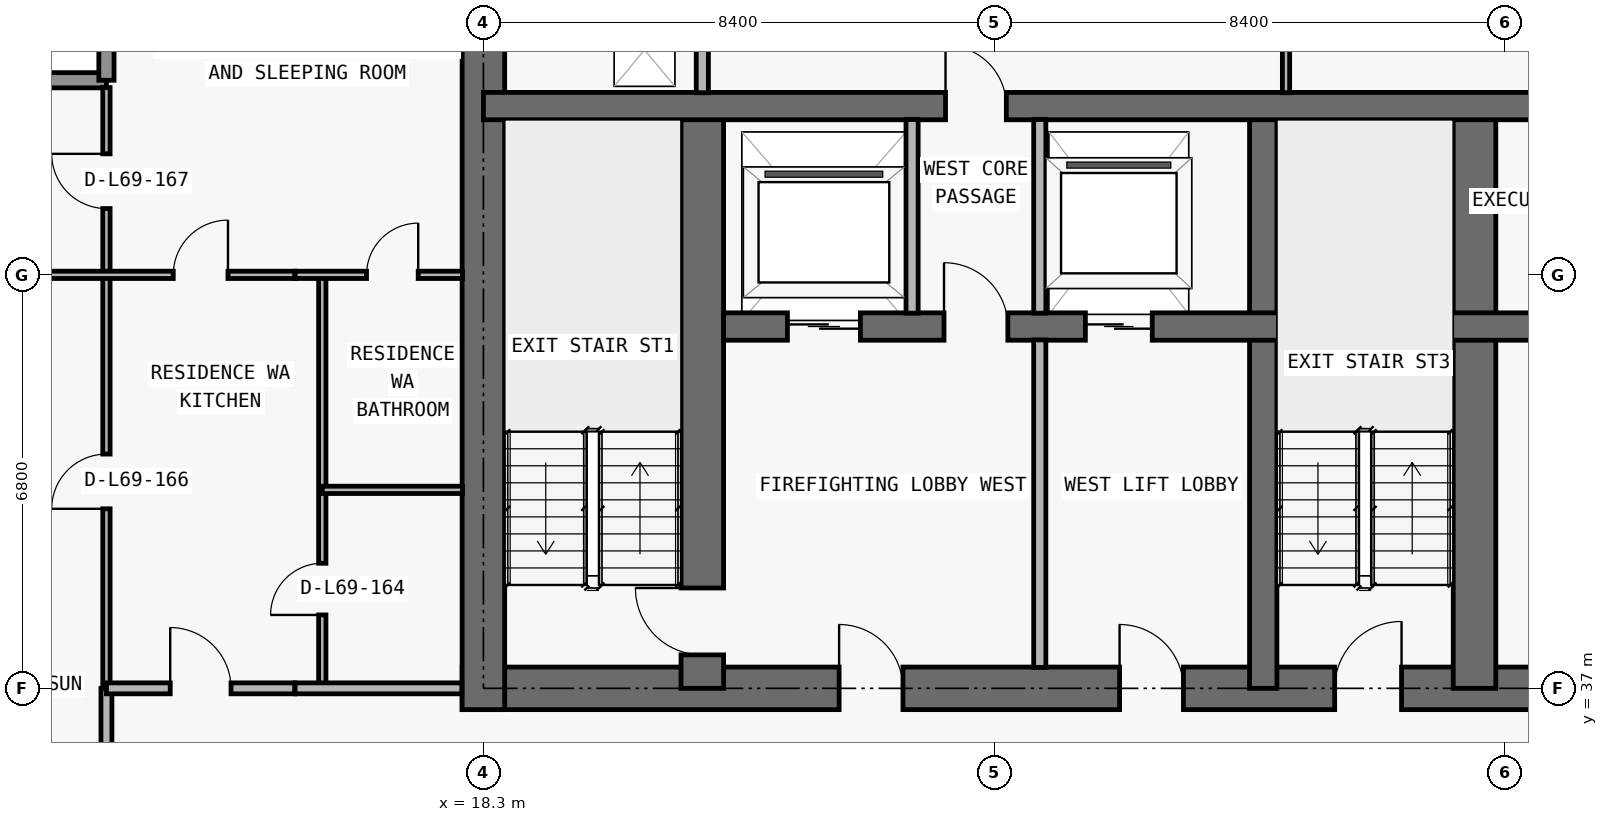
"""IFC4 building model, lengths in metres.
Left out: names, types, materials, properties, quantities, classifications, styles, units other than length and angle.
Written with IfcOpenShell. Run it as: python <this file> out.ifc"""

import sys

from ifc_helpers import new_model, si_unit, direction, frame, frame_2d, origin, place, context, subcontext, project, spatial, rectangle, extrude, element, fill, save


model = new_model("IFC4")
c1 = context("Model", 3, precision=1e-05, world=origin(), true_north=direction((0.0, 1.0)))
c2 = subcontext(c1, "Body", "Model", "MODEL_VIEW")
j1 = project(units=[si_unit("LENGTHUNIT", "METRE"), si_unit("PLANEANGLEUNIT", "RADIAN")], contexts=[c1])
p1 = place(None, origin())
s1 = spatial("IfcSite", under=j1, at=p1, CompositionType="ELEMENT")
p2 = place(p1, origin())
s2 = spatial("IfcBuilding", under=s1, at=p2, CompositionType="ELEMENT")
p3 = place(p2, frame((0.0, 0.0, 246.3)))
s3 = spatial("IfcBuildingStorey", under=s2, at=p3, CompositionType="ELEMENT", Elevation=246.3)
p4 = place(p3, frame((17.95, 37.0, 0.0), z_axis=(0.0, 0.0, 1.0), x_axis=(1.0, 0.0, 0.0)))
e1 = element("IfcWall", 1, at=p4, inside=s3, PredefinedType="SHEAR", context=c2, shape_type="SweptSolid", body=[
    extrude(rectangle(XDim=41.9, YDim=0.7, at=frame_2d((20.95, 0.0))), origin(), (0.0, 0.0, 1.0), 3.05),
])
p5 = place(p4, frame((14.35, 0.0, 0.0)))
e2 = element("IfcOpeningElement", 2, at=p5, cuts=e1, PredefinedType="OPENING", context=c2, shape_type="SweptSolid", body=[
    extrude(rectangle(XDim=1.1, YDim=2.15, at=frame_2d((0.55, 1.075))), frame((0.0, 0.36, 0.0), z_axis=(0.0, -1.0, 0.0), x_axis=(1.0, 0.0, 0.0)), (0.0, 0.0, 1.0), 0.72),
])
p6 = place(p4, frame((6.2, 0.0, 0.0)))
e3 = element("IfcOpeningElement", 3, at=p6, cuts=e1, PredefinedType="OPENING", context=c2, shape_type="SweptSolid", body=[
    extrude(rectangle(XDim=1.05, YDim=2.15, at=frame_2d((0.525, 1.075))), frame((0.0, 0.36, 0.0), z_axis=(0.0, -1.0, 0.0), x_axis=(1.0, 0.0, 0.0)), (0.0, 0.0, 1.0), 0.72),
])
p7 = place(p4, frame((34.7, 0.0, 0.0)))
e4 = element("IfcOpeningElement", 4, at=p7, cuts=e1, PredefinedType="OPENING", context=c2, shape_type="SweptSolid", body=[
    extrude(rectangle(XDim=1.05, YDim=2.15, at=frame_2d((0.525, 1.075))), frame((0.0, 0.36, 0.0), z_axis=(0.0, -1.0, 0.0), x_axis=(1.0, 0.0, 0.0)), (0.0, 0.0, 1.0), 0.72),
])
p8 = place(p4, frame((10.812, 0.0, 0.0)))
e5 = element("IfcOpeningElement", 5, at=p8, cuts=e1, PredefinedType="OPENING", context=c2, shape_type="SweptSolid", body=[
    extrude(rectangle(XDim=1.05, YDim=2.15, at=frame_2d((0.525, 1.075))), frame((0.0, 0.36, 0.0), z_axis=(0.0, -1.0, 0.0), x_axis=(1.0, 0.0, 0.0)), (0.0, 0.0, 1.0), 0.72),
])
p9 = place(p4, frame((24.05, 0.0, 0.0)))
e6 = element("IfcOpeningElement", 6, at=p9, cuts=e1, PredefinedType="OPENING", context=c2, shape_type="SweptSolid", body=[
    extrude(rectangle(XDim=1.05, YDim=2.15, at=frame_2d((0.525, 1.075))), frame((0.0, 0.36, 0.0), z_axis=(0.0, -1.0, 0.0), x_axis=(1.0, 0.0, 0.0)), (0.0, 0.0, 1.0), 0.72),
])
p10 = place(p3, frame((18.3, 36.65, 0.0), z_axis=(0.0, 0.0, 1.0), x_axis=(0.0, 1.0, 0.0)))
e7 = element("IfcWall", 7, at=p10, inside=s3, PredefinedType="SHEAR", context=c2, shape_type="SweptSolid", body=[
    extrude(rectangle(XDim=13.95, YDim=0.7, at=frame_2d((6.975, 0.0))), origin(), (0.0, 0.0, 1.0), 3.05),
])
p11 = place(p3, frame((21.9, 37.0, 0.0), z_axis=(0.0, 0.0, 1.0), x_axis=(0.0, 1.0, 0.0)))
e8 = element("IfcWall", 8, at=p11, inside=s3, PredefinedType="SHEAR", context=c2, shape_type="SweptSolid", body=[
    extrude(rectangle(XDim=9.575, YDim=0.7, at=frame_2d((4.788, 0.0))), origin(), (0.0, 0.0, 1.0), 3.05),
])
p12 = place(p11, frame((0.55, 0.0, 0.0)))
e9 = element("IfcOpeningElement", 9, at=p12, cuts=e8, PredefinedType="OPENING", context=c2, shape_type="SweptSolid", body=[
    extrude(rectangle(XDim=1.1, YDim=2.15, at=frame_2d((0.55, 1.075))), frame((0.0, 0.36, 0.0), z_axis=(0.0, -1.0, 0.0), x_axis=(1.0, 0.0, 0.0)), (0.0, 0.0, 1.0), 0.72),
])
p13 = place(p3, frame((31.125, 37.0, 0.0), z_axis=(0.0, 0.0, 1.0), x_axis=(0.0, 1.0, 0.0)))
e10 = element("IfcWall", 10, at=p13, inside=s3, PredefinedType="SHEAR", context=c2, shape_type="SweptSolid", body=[
    extrude(rectangle(XDim=9.575, YDim=0.45, at=frame_2d((4.788, 0.0))), origin(), (0.0, 0.0, 1.0), 3.05),
])
p14 = place(p3, frame((34.6, 37.0, 0.0), z_axis=(0.0, 0.0, 1.0), x_axis=(0.0, 1.0, 0.0)))
e11 = element("IfcWall", 11, at=p14, inside=s3, PredefinedType="SHEAR", context=c2, shape_type="SweptSolid", body=[
    extrude(rectangle(XDim=9.575, YDim=0.7, at=frame_2d((4.788, 0.0))), origin(), (0.0, 0.0, 1.0), 3.05),
])
p15 = place(p3, frame((22.25, 42.95, 0.0), z_axis=(0.0, 0.0, 1.0), x_axis=(1.0, 0.0, 0.0)))
e12 = element("IfcWall", 12, at=p15, inside=s3, PredefinedType="SHEAR", context=c2, shape_type="SweptSolid", body=[
    extrude(rectangle(XDim=33.3, YDim=0.45, at=frame_2d((16.65, 0.0))), origin(), (0.0, 0.0, 1.0), 3.05),
])
p16 = place(p15, frame((1.05, 0.0, 0.0)))
e13 = element("IfcOpeningElement", 13, at=p16, cuts=e12, PredefinedType="OPENING", context=c2, shape_type="SweptSolid", body=[
    extrude(rectangle(XDim=1.2, YDim=2.2, at=frame_2d((0.6, 1.1))), frame((0.0, 0.235, 0.0), z_axis=(0.0, -1.0, 0.0), x_axis=(1.0, 0.0, 0.0)), (0.0, 0.0, 1.0), 0.47),
])
p17 = place(p15, frame((31.05, 0.0, 0.0)))
e14 = element("IfcOpeningElement", 14, at=p17, cuts=e12, PredefinedType="OPENING", context=c2, shape_type="SweptSolid", body=[
    extrude(rectangle(XDim=1.2, YDim=2.2, at=frame_2d((0.6, 1.1))), frame((0.0, 0.235, 0.0), z_axis=(0.0, -1.0, 0.0), x_axis=(1.0, 0.0, 0.0)), (0.0, 0.0, 1.0), 0.47),
])
p18 = place(p15, frame((26.45, 0.0, 0.0)))
e15 = element("IfcOpeningElement", 15, at=p18, cuts=e12, PredefinedType="OPENING", context=c2, shape_type="SweptSolid", body=[
    extrude(rectangle(XDim=1.1, YDim=2.2, at=frame_2d((0.55, 1.1))), frame((0.0, 0.235, 0.0), z_axis=(0.0, -1.0, 0.0), x_axis=(1.0, 0.0, 0.0)), (0.0, 0.0, 1.0), 0.47),
])
p19 = place(p15, frame((5.95, 0.0, 0.0)))
e16 = element("IfcOpeningElement", 16, at=p19, cuts=e12, PredefinedType="OPENING", context=c2, shape_type="SweptSolid", body=[
    extrude(rectangle(XDim=1.1, YDim=2.2, at=frame_2d((0.55, 1.1))), frame((0.0, 0.235, 0.0), z_axis=(0.0, -1.0, 0.0), x_axis=(1.0, 0.0, 0.0)), (0.0, 0.0, 1.0), 0.47),
])
p20 = place(p15, frame((3.625, 0.0, 0.0)))
e17 = element("IfcOpeningElement", 17, at=p20, cuts=e12, PredefinedType="OPENING", context=c2, shape_type="SweptSolid", body=[
    extrude(rectangle(XDim=1.05, YDim=2.15, at=frame_2d((0.525, 1.075))), frame((0.0, 0.235, 0.0), z_axis=(0.0, -1.0, 0.0), x_axis=(1.0, 0.0, 0.0)), (0.0, 0.0, 1.0), 0.47),
])
p21 = place(p15, frame((28.675, 0.0, 0.0)))
e18 = element("IfcOpeningElement", 18, at=p21, cuts=e12, PredefinedType="OPENING", context=c2, shape_type="SweptSolid", body=[
    extrude(rectangle(XDim=1.05, YDim=2.15, at=frame_2d((0.525, 1.075))), frame((0.0, 0.235, 0.0), z_axis=(0.0, -1.0, 0.0), x_axis=(1.0, 0.0, 0.0)), (0.0, 0.0, 1.0), 0.47),
])
p22 = place(p15, frame((14.7, 0.0, 0.0)))
e19 = element("IfcOpeningElement", 19, at=p22, cuts=e12, PredefinedType="OPENING", context=c2, shape_type="SweptSolid", body=[
    extrude(rectangle(XDim=1.0, YDim=2.2, at=frame_2d((0.5, 1.1))), frame((0.0, 0.235, 0.0), z_axis=(0.0, -1.0, 0.0), x_axis=(1.0, 0.0, 0.0)), (0.0, 0.0, 1.0), 0.47),
])
p23 = place(p15, frame((21.45, 0.0, 0.0)))
e20 = element("IfcOpeningElement", 20, at=p23, cuts=e12, PredefinedType="OPENING", context=c2, shape_type="SweptSolid", body=[
    extrude(rectangle(XDim=1.0, YDim=2.2, at=frame_2d((0.5, 1.1))), frame((0.0, 0.235, 0.0), z_axis=(0.0, -1.0, 0.0), x_axis=(1.0, 0.0, 0.0)), (0.0, 0.0, 1.0), 0.47),
])
p24 = place(p3, frame((18.3, 46.575, 0.0), z_axis=(0.0, 0.0, 1.0), x_axis=(1.0, 0.0, 0.0)))
e21 = element("IfcWall", 21, at=p24, inside=s3, PredefinedType="SHEAR", context=c2, shape_type="SweptSolid", body=[
    extrude(rectangle(XDim=41.2, YDim=0.45, at=frame_2d((20.6, 0.0))), origin(), (0.0, 0.0, 1.0), 3.05),
])
p25 = place(p24, frame((7.6, 0.0, 0.0)))
e22 = element("IfcOpeningElement", 22, at=p25, cuts=e21, PredefinedType="OPENING", context=c2, shape_type="SweptSolid", body=[
    extrude(rectangle(XDim=1.0, YDim=2.2, at=frame_2d((0.5, 1.1))), frame((0.0, 0.235, 0.0), z_axis=(0.0, -1.0, 0.0), x_axis=(1.0, 0.0, 0.0)), (0.0, 0.0, 1.0), 0.47),
])
p26 = place(p24, frame((32.625, 0.0, 0.0)))
e23 = element("IfcOpeningElement", 23, at=p26, cuts=e21, PredefinedType="OPENING", context=c2, shape_type="SweptSolid", body=[
    extrude(rectangle(XDim=1.05, YDim=2.15, at=frame_2d((0.525, 1.075))), frame((0.0, 0.235, 0.0), z_axis=(0.0, -1.0, 0.0), x_axis=(1.0, 0.0, 0.0)), (0.0, 0.0, 1.0), 0.47),
])
p27 = place(p3, frame((8.25, 47.0, 0.0), z_axis=(0.0, 0.0, 1.0), x_axis=(1.0, 0.0, 0.0)))
e24 = element("IfcWall", 24, at=p27, inside=s3, PredefinedType="ELEMENTEDWALL", context=c2, shape_type="SweptSolid", body=[
    extrude(rectangle(XDim=3.85, YDim=0.25, at=frame_2d((1.925, 0.0))), origin(), (0.0, 0.0, 1.0), 3.05),
])
p28 = place(p3, frame((12.1, 47.0, 0.0), z_axis=(0.0, 0.0, 1.0), x_axis=(0.0, 1.0, 0.0)))
e25 = element("IfcWall", 25, at=p28, inside=s3, PredefinedType="ELEMENTEDWALL", context=c2, shape_type="SweptSolid", body=[
    extrude(rectangle(XDim=3.45, YDim=0.25, at=frame_2d((1.725, 0.0))), origin(), (0.0, 0.0, 1.0), 3.05),
])
p29 = place(p3, frame((12.1, 33.705, 0.0), z_axis=(0.0, 0.0, 1.0), x_axis=(0.0, 1.0, 0.0)))
e26 = element("IfcWall", 26, at=p29, inside=s3, PredefinedType="PARTITIONING", context=c2, shape_type="SweptSolid", body=[
    extrude(rectangle(XDim=3.295, YDim=0.18, at=frame_2d((1.647, 0.0))), origin(), (0.0, 0.0, 1.0), 2.725),
])
p30 = place(p3, frame((12.1, 37.005, 0.0), z_axis=(0.0, 0.0, 1.0), x_axis=(0.0, 1.0, 0.0)))
e27 = element("IfcWall", 27, at=p30, inside=s3, PredefinedType="PARTITIONING", context=c2, shape_type="SweptSolid", body=[
    extrude(rectangle(XDim=9.875, YDim=0.12, at=frame_2d((4.938, 0.0))), origin(), (0.0, 0.0, 1.0), 2.725),
])
p31 = place(p30, frame((2.948, 0.0, 0.0)))
e28 = element("IfcOpeningElement", 28, at=p31, cuts=e27, PredefinedType="OPENING", context=c2, shape_type="SweptSolid", body=[
    extrude(rectangle(XDim=0.9, YDim=2.15, at=frame_2d((0.45, 1.075))), frame((0.0, 0.07, 0.0), z_axis=(0.0, -1.0, 0.0), x_axis=(1.0, 0.0, 0.0)), (0.0, 0.0, 1.0), 0.14),
])
p32 = place(p30, frame((7.885, 0.0, 0.0)))
e29 = element("IfcOpeningElement", 29, at=p32, cuts=e27, PredefinedType="OPENING", context=c2, shape_type="SweptSolid", body=[
    extrude(rectangle(XDim=0.9, YDim=2.15, at=frame_2d((0.45, 1.075))), frame((0.0, 0.07, 0.0), z_axis=(0.0, -1.0, 0.0), x_axis=(1.0, 0.0, 0.0)), (0.0, 0.0, 1.0), 0.14),
])
p33 = place(p3, frame((15.65, 37.0, 0.0), z_axis=(0.0, 0.0, 1.0), x_axis=(0.0, 1.0, 0.0)))
e30 = element("IfcWall", 30, at=p33, inside=s3, PredefinedType="PARTITIONING", context=c2, shape_type="SweptSolid", body=[
    extrude(rectangle(XDim=6.8, YDim=0.12, at=frame_2d((3.4, 0.0))), origin(), (0.0, 0.0, 1.0), 3.05),
])
p34 = place(p33, frame((1.207, 0.0, 0.0)))
e31 = element("IfcOpeningElement", 31, at=p34, cuts=e30, PredefinedType="OPENING", context=c2, shape_type="SweptSolid", body=[
    extrude(rectangle(XDim=0.85, YDim=2.1, at=frame_2d((0.425, 1.05))), frame((0.0, 0.07, 0.0), z_axis=(0.0, -1.0, 0.0), x_axis=(1.0, 0.0, 0.0)), (0.0, 0.0, 1.0), 0.14),
])
p35 = place(p3, frame((21.9, 46.795, 0.0), z_axis=(0.0, 0.0, 1.0), x_axis=(0.0, 1.0, 0.0)))
e32 = element("IfcWall", 32, at=p35, inside=s3, PredefinedType="PARTITIONING", context=c2, shape_type="SweptSolid", body=[
    extrude(rectangle(XDim=3.16, YDim=0.2, at=frame_2d((1.58, 0.0))), origin(), (0.0, 0.0, 1.0), 3.05),
])
p36 = place(p3, frame((25.35, 43.17, 0.0), z_axis=(0.0, 0.0, 1.0), x_axis=(0.0, 1.0, 0.0)))
e33 = element("IfcWall", 33, at=p36, inside=s3, PredefinedType="PARTITIONING", context=c2, shape_type="SweptSolid", body=[
    extrude(rectangle(XDim=3.185, YDim=0.2, at=frame_2d((1.593, 0.0))), origin(), (0.0, 0.0, 1.0), 3.05),
])
p37 = place(p3, frame((27.45, 37.345, 0.0), z_axis=(0.0, 0.0, 1.0), x_axis=(0.0, 1.0, 0.0)))
e34 = element("IfcWall", 34, at=p37, inside=s3, PredefinedType="PARTITIONING", context=c2, shape_type="SweptSolid", body=[
    extrude(rectangle(XDim=5.385, YDim=0.2, at=frame_2d((2.692, 0.0))), origin(), (0.0, 0.0, 1.0), 3.05),
])
p38 = place(p3, frame((27.45, 43.17, 0.0), z_axis=(0.0, 0.0, 1.0), x_axis=(0.0, 1.0, 0.0)))
e35 = element("IfcWall", 35, at=p38, inside=s3, PredefinedType="PARTITIONING", context=c2, shape_type="SweptSolid", body=[
    extrude(rectangle(XDim=3.185, YDim=0.2, at=frame_2d((1.593, 0.0))), origin(), (0.0, 0.0, 1.0), 3.05),
])
p39 = place(p3, frame((31.5, 46.795, 0.0), z_axis=(0.0, 0.0, 1.0), x_axis=(0.0, 1.0, 0.0)))
e36 = element("IfcWall", 36, at=p39, inside=s3, PredefinedType="PARTITIONING", context=c2, shape_type="SweptSolid", body=[
    extrude(rectangle(XDim=3.16, YDim=0.12, at=frame_2d((1.58, 0.0))), origin(), (0.0, 0.0, 1.0), 3.05),
])
p40 = place(p3, frame((12.1, 37.0, 0.0), z_axis=(0.0, 0.0, 1.0), x_axis=(1.0, 0.0, 0.0)))
e37 = element("IfcWall", 37, at=p40, inside=s3, PredefinedType="PARTITIONING", context=c2, shape_type="SweptSolid", body=[
    extrude(rectangle(XDim=3.098, YDim=0.18, at=frame_2d((1.549, 0.0))), origin(), (0.0, 0.0, 1.0), 3.05),
])
p41 = place(p40, frame((1.049, 0.0, 0.0)))
e38 = element("IfcOpeningElement", 38, at=p41, cuts=e37, PredefinedType="OPENING", context=c2, shape_type="SweptSolid", body=[
    extrude(rectangle(XDim=1.0, YDim=2.2, at=frame_2d((0.5, 1.1))), frame((0.0, 0.1, 0.0), z_axis=(0.0, -1.0, 0.0), x_axis=(1.0, 0.0, 0.0)), (0.0, 0.0, 1.0), 0.2),
])
p42 = place(p3, frame((15.203, 37.0, 0.0), z_axis=(0.0, 0.0, 1.0), x_axis=(1.0, 0.0, 0.0)))
e39 = element("IfcWall", 39, at=p42, inside=s3, PredefinedType="PARTITIONING", context=c2, shape_type="SweptSolid", body=[
    extrude(rectangle(XDim=2.742, YDim=0.18, at=frame_2d((1.371, 0.0))), origin(), (0.0, 0.0, 1.0), 3.05),
])
p43 = place(p3, frame((15.65, 40.264, 0.0), z_axis=(0.0, 0.0, 1.0), x_axis=(1.0, 0.0, 0.0)))
e40 = element("IfcWall", 40, at=p43, inside=s3, PredefinedType="PARTITIONING", context=c2, shape_type="SweptSolid", body=[
    extrude(rectangle(XDim=2.305, YDim=0.12, at=frame_2d((1.153, 0.0))), origin(), (0.0, 0.0, 1.0), 3.05),
])
p44 = place(p3, frame((8.395, 43.8, 0.0), z_axis=(0.0, 0.0, 1.0), x_axis=(1.0, 0.0, 0.0)))
e41 = element("IfcWall", 41, at=p44, inside=s3, PredefinedType="PARTITIONING", context=c2, shape_type="SweptSolid", body=[
    extrude(rectangle(XDim=6.803, YDim=0.12, at=frame_2d((3.401, 0.0))), origin(), (0.0, 0.0, 1.0), 2.418),
])
p45 = place(p44, frame((4.804, 0.0, 0.0)))
e42 = element("IfcOpeningElement", 42, at=p45, cuts=e41, PredefinedType="OPENING", context=c2, shape_type="SweptSolid", body=[
    extrude(rectangle(XDim=0.9, YDim=2.15, at=frame_2d((0.45, 1.075))), frame((0.0, 0.07, 0.0), z_axis=(0.0, -1.0, 0.0), x_axis=(1.0, 0.0, 0.0)), (0.0, 0.0, 1.0), 0.14),
])
p46 = place(p3, frame((15.203, 43.8, 0.0), z_axis=(0.0, 0.0, 1.0), x_axis=(1.0, 0.0, 0.0)))
e43 = element("IfcWall", 43, at=p46, inside=s3, PredefinedType="PARTITIONING", context=c2, shape_type="SweptSolid", body=[
    extrude(rectangle(XDim=2.752, YDim=0.12, at=frame_2d((1.376, 0.0))), origin(), (0.0, 0.0, 1.0), 2.418),
])
p47 = place(p46, frame((1.175, 0.0, 0.0)))
e44 = element("IfcOpeningElement", 44, at=p47, cuts=e43, PredefinedType="OPENING", context=c2, shape_type="SweptSolid", body=[
    extrude(rectangle(XDim=0.85, YDim=2.1, at=frame_2d((0.425, 1.05))), frame((0.0, 0.07, 0.0), z_axis=(0.0, -1.0, 0.0), x_axis=(1.0, 0.0, 0.0)), (0.0, 0.0, 1.0), 0.14),
])
p48 = place(p16, origin())
e45 = element("IfcDoor", 45, at=p48, inside=s3, OperationType="DOUBLE_DOOR_SLIDING", PredefinedType="DOOR", context=c2, shape_type="SweptSolid", body=[
    extrude(rectangle(XDim=1.2, YDim=2.2, at=frame_2d((0.6, 1.1))), frame((0.0, 0.025, 0.0), z_axis=(0.0, -1.0, 0.0), x_axis=(1.0, 0.0, 0.0)), (0.0, 0.0, 1.0), 0.05),
])
fill(e13, e45)
p49 = place(p19, origin())
e46 = element("IfcDoor", 46, at=p49, inside=s3, OperationType="DOUBLE_DOOR_SLIDING", PredefinedType="DOOR", context=c2, shape_type="SweptSolid", body=[
    extrude(rectangle(XDim=1.1, YDim=2.2, at=frame_2d((0.55, 1.1))), frame((0.0, 0.025, 0.0), z_axis=(0.0, -1.0, 0.0), x_axis=(1.0, 0.0, 0.0)), (0.0, 0.0, 1.0), 0.05),
])
fill(e16, e46)
p50 = place(p5, origin())
e47 = element("IfcDoor", 47, at=p50, inside=s3, OperationType="SINGLE_SWING_RIGHT", PredefinedType="DOOR", context=c2, shape_type="SweptSolid", body=[
    extrude(rectangle(XDim=1.1, YDim=2.15, at=frame_2d((0.55, 1.075))), frame((0.0, 0.025, 0.0), z_axis=(0.0, -1.0, 0.0), x_axis=(1.0, 0.0, 0.0)), (0.0, 0.0, 1.0), 0.05),
])
fill(e2, e47)
p51 = place(p6, origin())
e48 = element("IfcDoor", 48, at=p51, inside=s3, OperationType="SINGLE_SWING_LEFT", PredefinedType="DOOR", context=c2, shape_type="SweptSolid", body=[
    extrude(rectangle(XDim=1.05, YDim=2.15, at=frame_2d((0.525, 1.075))), frame((0.0, 0.025, 0.0), z_axis=(0.0, -1.0, 0.0), x_axis=(1.0, 0.0, 0.0)), (0.0, 0.0, 1.0), 0.05),
])
fill(e3, e48)
p52 = place(p12, origin())
e49 = element("IfcDoor", 49, at=p52, inside=s3, OperationType="SINGLE_SWING_RIGHT", PredefinedType="DOOR", context=c2, shape_type="SweptSolid", body=[
    extrude(rectangle(XDim=1.1, YDim=2.15, at=frame_2d((0.55, 1.075))), frame((0.0, 0.025, 0.0), z_axis=(0.0, -1.0, 0.0), x_axis=(1.0, 0.0, 0.0)), (0.0, 0.0, 1.0), 0.05),
])
fill(e9, e49)
p53 = place(p20, origin())
e50 = element("IfcDoor", 50, at=p53, inside=s3, OperationType="SINGLE_SWING_LEFT", PredefinedType="DOOR", context=c2, shape_type="SweptSolid", body=[
    extrude(rectangle(XDim=1.05, YDim=2.15, at=frame_2d((0.525, 1.075))), frame((0.0, 0.025, 0.0), z_axis=(0.0, -1.0, 0.0), x_axis=(1.0, 0.0, 0.0)), (0.0, 0.0, 1.0), 0.05),
])
fill(e17, e50)
p54 = place(p8, origin())
e51 = element("IfcDoor", 51, at=p54, inside=s3, OperationType="SINGLE_SWING_LEFT", PredefinedType="DOOR", context=c2, shape_type="SweptSolid", body=[
    extrude(rectangle(XDim=1.05, YDim=2.15, at=frame_2d((0.525, 1.075))), frame((0.0, 0.025, 0.0), z_axis=(0.0, -1.0, 0.0), x_axis=(1.0, 0.0, 0.0)), (0.0, 0.0, 1.0), 0.05),
])
fill(e5, e51)
p55 = place(p25, origin())
e52 = element("IfcDoor", 52, at=p55, inside=s3, OperationType="SINGLE_SWING_LEFT", PredefinedType="DOOR", context=c2, shape_type="SweptSolid", body=[
    extrude(rectangle(XDim=1.0, YDim=2.2, at=frame_2d((0.5, 1.1))), frame((0.0, 0.025, 0.0), z_axis=(0.0, -1.0, 0.0), x_axis=(1.0, 0.0, 0.0)), (0.0, 0.0, 1.0), 0.05),
])
fill(e22, e52)
p56 = place(p41, origin())
e53 = element("IfcDoor", 53, at=p56, inside=s3, OperationType="SINGLE_SWING_LEFT", PredefinedType="DOOR", context=c2, shape_type="SweptSolid", body=[
    extrude(rectangle(XDim=1.0, YDim=2.2, at=frame_2d((0.5, 1.1))), frame((0.0, 0.025, 0.0), z_axis=(0.0, -1.0, 0.0), x_axis=(1.0, 0.0, 0.0)), (0.0, 0.0, 1.0), 0.05),
])
fill(e38, e53)
p57 = place(p45, origin())
e54 = element("IfcDoor", 54, at=p57, inside=s3, OperationType="SINGLE_SWING_RIGHT", PredefinedType="DOOR", context=c2, shape_type="SweptSolid", body=[
    extrude(rectangle(XDim=0.9, YDim=2.15, at=frame_2d((0.45, 1.075))), frame((0.0, 0.025, 0.0), z_axis=(0.0, -1.0, 0.0), x_axis=(1.0, 0.0, 0.0)), (0.0, 0.0, 1.0), 0.05),
])
fill(e42, e54)
p58 = place(p34, origin())
e55 = element("IfcDoor", 55, at=p58, inside=s3, OperationType="SINGLE_SWING_LEFT", PredefinedType="DOOR", context=c2, shape_type="SweptSolid", body=[
    extrude(rectangle(XDim=0.85, YDim=2.1, at=frame_2d((0.425, 1.05))), frame((0.0, 0.025, 0.0), z_axis=(0.0, -1.0, 0.0), x_axis=(1.0, 0.0, 0.0)), (0.0, 0.0, 1.0), 0.05),
])
fill(e31, e55)
p59 = place(p47, origin())
e56 = element("IfcDoor", 56, at=p59, inside=s3, OperationType="SINGLE_SWING_RIGHT", PredefinedType="DOOR", context=c2, shape_type="SweptSolid", body=[
    extrude(rectangle(XDim=0.85, YDim=2.1, at=frame_2d((0.425, 1.05))), frame((0.0, 0.025, 0.0), z_axis=(0.0, -1.0, 0.0), x_axis=(1.0, 0.0, 0.0)), (0.0, 0.0, 1.0), 0.05),
])
fill(e44, e56)
p60 = place(p31, origin())
e57 = element("IfcDoor", 57, at=p60, inside=s3, OperationType="SINGLE_SWING_LEFT", PredefinedType="DOOR", context=c2, shape_type="SweptSolid", body=[
    extrude(rectangle(XDim=0.9, YDim=2.15, at=frame_2d((0.45, 1.075))), frame((0.0, 0.025, 0.0), z_axis=(0.0, -1.0, 0.0), x_axis=(1.0, 0.0, 0.0)), (0.0, 0.0, 1.0), 0.05),
])
fill(e28, e57)
p61 = place(p32, origin())
e58 = element("IfcDoor", 58, at=p61, inside=s3, OperationType="SINGLE_SWING_RIGHT", PredefinedType="DOOR", context=c2, shape_type="SweptSolid", body=[
    extrude(rectangle(XDim=0.9, YDim=2.15, at=frame_2d((0.45, 1.075))), frame((0.0, 0.025, 0.0), z_axis=(0.0, -1.0, 0.0), x_axis=(1.0, 0.0, 0.0)), (0.0, 0.0, 1.0), 0.05),
])
fill(e29, e58)
save(model, sys.argv[1])
